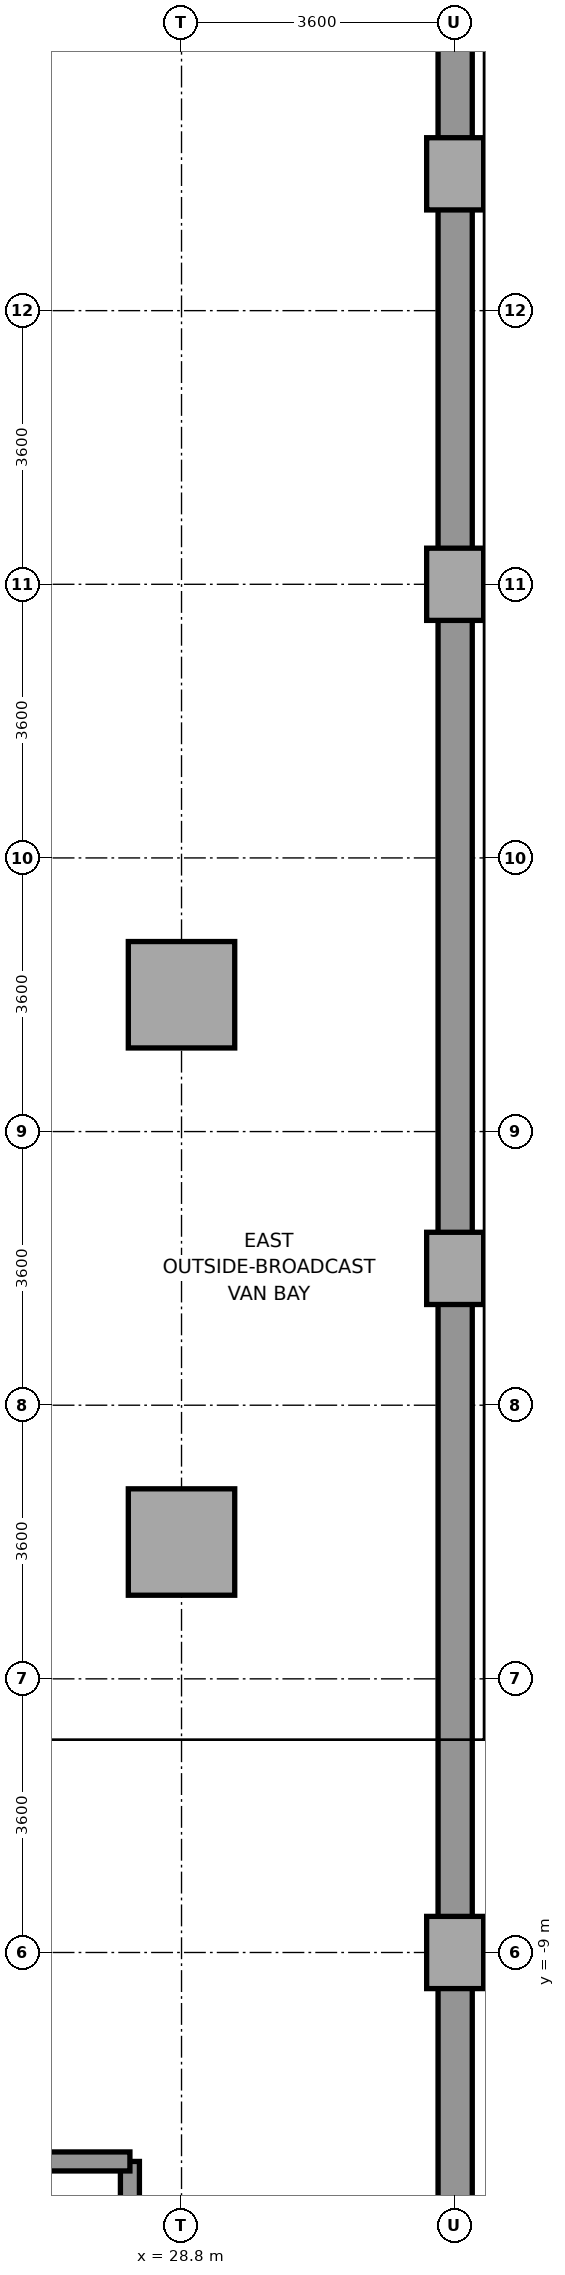
"""IFC4 building model, lengths in metres.
Left out: names, types, materials, properties, quantities, classifications, styles, units other than length and angle.
Written with IfcOpenShell. Run it as: python <this file> out.ifc"""

import sys

from ifc_helpers import new_model, si_unit, direction, frame, frame_2d, origin, origin_2d, place, context, subcontext, project, spatial, rectangle, extrude, source, transform, mapped, element, save


model = new_model("IFC4")
c1 = context("Model", 3, precision=1e-05, world=origin(), true_north=direction((0.0, 1.0)))
c2 = subcontext(c1, "Body", "Model", "MODEL_VIEW")
j1 = project(units=[si_unit("LENGTHUNIT", "METRE"), si_unit("PLANEANGLEUNIT", "RADIAN")], contexts=[c1])
p1 = place(None, origin())
s1 = spatial("IfcSite", under=j1, at=p1, CompositionType="ELEMENT")
p2 = place(p1, origin())
s2 = spatial("IfcBuilding", under=s1, at=p2, CompositionType="ELEMENT")
p3 = place(p2, frame((0.0, 0.0, -4.2)))
s3 = spatial("IfcBuildingStorey", under=s2, at=p3, CompositionType="ELEMENT", Elevation=-4.2)
m1 = source(origin(), c2, "Body", "SweptSolid", [
    extrude(rectangle(XDim=1.4, YDim=1.4, at=origin_2d()), origin(), (0.0, 0.0, 1.0), 3.95),
])
for number, where, z_axis, x_axis in (
    (1, (28.8, -3.6, 0.0), (0.0, 0.0, 1.0), (1.0, 0.0, 0.0)),
    (2, (28.8, 3.6, 0.0), (0.0, 0.0, 1.0), (1.0, 0.0, 0.0)),
):
    element("IfcColumn", number, at=place(p3, frame(where, z_axis=z_axis, x_axis=x_axis)), inside=s3, PredefinedType="COLUMN", context=c2, shape_type="MappedRepresentation", body=[
        mapped(m1, transform((0.0, 0.0, 0.0), x_axis=(1.0, 0.0, 0.0), y_axis=(0.0, 1.0, 0.0), z_axis=(0.0, 0.0, 1.0), scale=1.0)),
    ])
m2 = source(origin(), c2, "Body", "SweptSolid", [
    extrude(rectangle(XDim=0.75, YDim=0.95, at=origin_2d()), origin(), (0.0, 0.0, 1.0), 3.95),
])
for number, where, z_axis, x_axis in (
    (3, (32.4, -9.0, 0.0), (0.0, 0.0, 1.0), (1.0, 0.0, 0.0)),
    (4, (32.4, 0.0, 0.0), (0.0, 0.0, 1.0), (1.0, 0.0, 0.0)),
    (5, (32.4, 9.0, 0.0), (0.0, 0.0, 1.0), (1.0, 0.0, 0.0)),
    (6, (32.4, 14.4, 0.0), (0.0, 0.0, 1.0), (1.0, 0.0, 0.0)),
):
    element("IfcColumn", number, at=place(p3, frame(where, z_axis=z_axis, x_axis=x_axis)), inside=s3, PredefinedType="COLUMN", context=c2, shape_type="MappedRepresentation", body=[
        mapped(m2, transform((0.0, 0.0, 0.0), x_axis=(1.0, 0.0, 0.0), y_axis=(0.0, 1.0, 0.0), z_axis=(0.0, 0.0, 1.0), scale=1.0)),
    ])
p4 = place(p3, frame((32.4, -19.8, 0.0), z_axis=(0.0, 0.0, 1.0), x_axis=(0.0, 1.0, 0.0)))
e7 = element("IfcWall", 7, at=p4, inside=s3, PredefinedType="USERDEFINED", context=c2, shape_type="SweptSolid", body=[
    extrude(rectangle(XDim=43.2, YDim=0.45, at=frame_2d((21.6, 0.0))), origin(), (0.0, 0.0, 1.0), 3.95),
])
p5 = place(p3, frame((28.121, -18.671, 0.0), z_axis=(0.0, 0.0, 1.0), x_axis=(0.0, 1.0, 0.0)))
e8 = element("IfcWall", 8, at=p5, inside=s3, PredefinedType="SOLIDWALL", context=c2, shape_type="SweptSolid", body=[
    extrude(rectangle(XDim=6.922, YDim=0.25, at=frame_2d((3.461, 0.0))), origin(), (0.0, 0.0, 1.0), 3.95),
])
p6 = place(p3, frame((24.999, -11.749, 0.0), z_axis=(0.0, 0.0, 1.0), x_axis=(1.0, 0.0, 0.0)))
e9 = element("IfcWall", 9, at=p6, inside=s3, PredefinedType="SOLIDWALL", context=c2, shape_type="SweptSolid", body=[
    extrude(rectangle(XDim=3.122, YDim=0.25, at=frame_2d((1.561, 0.0))), origin(), (0.0, 0.0, 1.0), 3.95),
])
p7 = place(p6, frame((0.8, 0.0, 0.0)))
e10 = element("IfcOpeningElement", 10, at=p7, cuts=e9, PredefinedType="OPENING", context=c2, shape_type="SweptSolid", body=[
    extrude(rectangle(XDim=1.2, YDim=2.2, at=frame_2d((0.6, 1.1))), frame((0.0, 0.135, 0.0), z_axis=(0.0, -1.0, 0.0), x_axis=(1.0, 0.0, 0.0)), (0.0, 0.0, 1.0), 0.27),
])
save(model, sys.argv[1])
